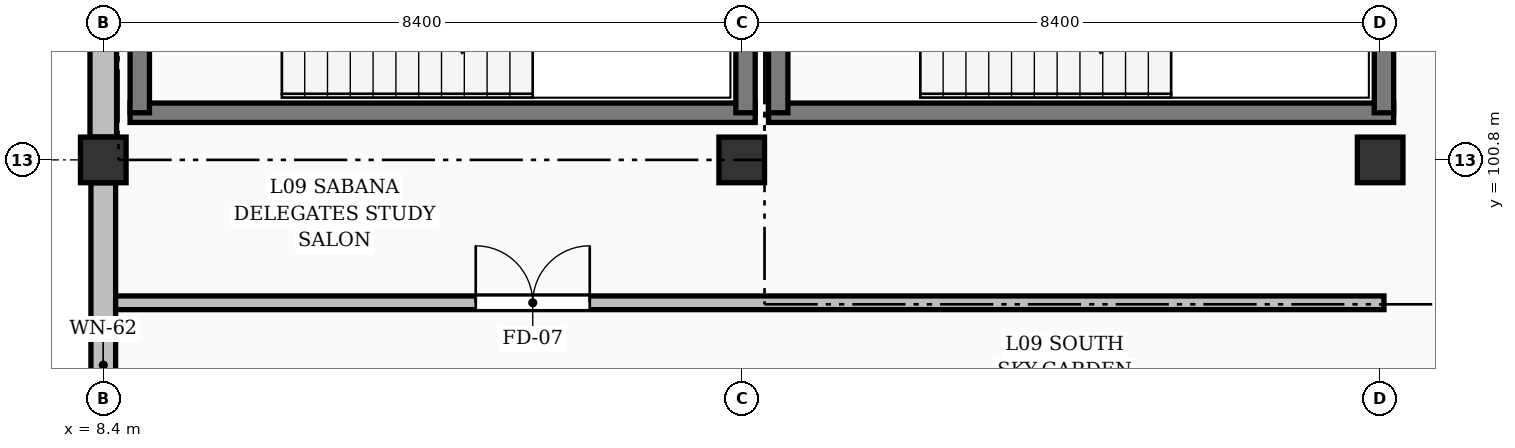
"""IFC4 building model, lengths in metres.
Left out: names, types, materials, properties, quantities, classifications, styles, units other than length and angle.
Written with IfcOpenShell. Run it as: python <this file> out.ifc"""

import sys

from ifc_helpers import new_model, si_unit, direction, frame, frame_2d, origin, origin_2d, place, context, subcontext, project, spatial, rectangle, extrude, element, fill, save


model = new_model("IFC4")
c1 = context("Model", 3, precision=1e-05, world=origin(), true_north=direction((0.0, 1.0)))
c2 = subcontext(c1, "Body", "Model", "MODEL_VIEW")
j1 = project(units=[si_unit("LENGTHUNIT", "METRE"), si_unit("PLANEANGLEUNIT", "RADIAN")], contexts=[c1])
p1 = place(None, origin())
s1 = spatial("IfcSite", under=j1, at=p1, CompositionType="ELEMENT")
p2 = place(p1, origin())
s2 = spatial("IfcBuilding", under=s1, at=p2, CompositionType="ELEMENT")
p3 = place(p2, frame((0.0, 0.0, 31.92)))
s3 = spatial("IfcBuildingStorey", under=s2, at=p3, CompositionType="ELEMENT", Elevation=31.92)
for number, where, z_axis, x_axis in (
    (1, (8.4, 100.8, 0.0), (0.0, 0.0, 1.0), (1.0, 0.0, 0.0)),
    (2, (16.8, 100.8, 0.0), (0.0, 0.0, 1.0), (1.0, 0.0, 0.0)),
    (3, (25.2, 100.8, 0.0), (0.0, 0.0, 1.0), (1.0, 0.0, 0.0)),
):
    element("IfcColumn", number, at=place(p3, frame(where, z_axis=z_axis, x_axis=x_axis)), inside=s3, PredefinedType="COLUMN", context=c2, shape_type="SweptSolid", body=[
        extrude(rectangle(XDim=0.6, YDim=0.6, at=origin_2d()), origin(), (0.0, 0.0, 1.0), 3.36),
    ])
p4 = place(p3, frame((8.4, 92.701, 0.0), z_axis=(0.0, 0.0, 1.0), x_axis=(0.0, 1.0, 0.0)))
e4 = element("IfcWall", 4, at=p4, inside=s3, PredefinedType="SOLIDWALL", context=c2, shape_type="SweptSolid", body=[
    extrude(rectangle(XDim=7.798, YDim=0.325, at=frame_2d((3.899, 0.0))), origin(), (0.0, 0.0, 1.0), 2.474),
])
p5 = place(p4, frame((2.429, 0.0, 0.3)))
e5 = element("IfcOpeningElement", 5, at=p5, cuts=e4, PredefinedType="OPENING", context=c2, shape_type="SweptSolid", body=[
    extrude(rectangle(XDim=0.84, YDim=1.75, at=frame_2d((0.42, 0.875))), frame((0.0, 0.172, 0.0), z_axis=(0.0, -1.0, 0.0), x_axis=(1.0, 0.0, 0.0)), (0.0, 0.0, 1.0), 0.345),
])
p6 = place(p4, frame((4.979, 0.0, 0.3)))
e6 = element("IfcOpeningElement", 6, at=p6, cuts=e4, PredefinedType="OPENING", context=c2, shape_type="SweptSolid", body=[
    extrude(rectangle(XDim=0.84, YDim=1.75, at=frame_2d((0.42, 0.875))), frame((0.0, 0.172, 0.0), z_axis=(0.0, -1.0, 0.0), x_axis=(1.0, 0.0, 0.0)), (0.0, 0.0, 1.0), 0.345),
])
p7 = place(p3, frame((8.4, 101.101, 0.0), z_axis=(0.0, 0.0, 1.0), x_axis=(0.0, 1.0, 0.0)))
e7 = element("IfcWall", 7, at=p7, inside=s3, PredefinedType="SOLIDWALL", context=c2, shape_type="SweptSolid", body=[
    extrude(rectangle(XDim=7.798, YDim=0.35, at=frame_2d((3.899, 0.0))), origin(), (0.0, 0.0, 1.0), 2.474),
])
p8 = place(p7, frame((2.499, 0.0, 0.3)))
e8 = element("IfcOpeningElement", 8, at=p8, cuts=e7, PredefinedType="OPENING", context=c2, shape_type="SweptSolid", body=[
    extrude(rectangle(XDim=0.7, YDim=1.9, at=frame_2d((0.35, 0.95))), frame((0.0, 0.185, 0.0), z_axis=(0.0, -1.0, 0.0), x_axis=(1.0, 0.0, 0.0)), (0.0, 0.0, 1.0), 0.37),
])
p9 = place(p7, frame((4.599, 0.0, 0.3)))
e9 = element("IfcOpeningElement", 9, at=p9, cuts=e7, PredefinedType="OPENING", context=c2, shape_type="SweptSolid", body=[
    extrude(rectangle(XDim=0.7, YDim=1.9, at=frame_2d((0.35, 0.95))), frame((0.0, 0.185, 0.0), z_axis=(0.0, -1.0, 0.0), x_axis=(1.0, 0.0, 0.0)), (0.0, 0.0, 1.0), 0.37),
])
p10 = place(p3, frame((8.752, 101.42, 0.0), z_axis=(0.0, 0.0, 1.0), x_axis=(1.0, 0.0, 0.0)))
e10 = element("IfcWall", 10, at=p10, inside=s3, PredefinedType="SOLIDWALL", context=c2, shape_type="SweptSolid", body=[
    extrude(rectangle(XDim=8.225, YDim=0.255, at=frame_2d((4.113, 0.0))), origin(), (0.0, 0.0, 1.0), 3.1),
])
for number, where, z_axis, x_axis in (
    (11, (8.88, 101.42, 0.0), (0.0, 0.0, 1.0), (0.0, 1.0, 0.0)),
    (12, (16.85, 101.42, 0.0), (0.0, 0.0, 1.0), (0.0, 1.0, 0.0)),
):
    element("IfcWall", number, at=place(p3, frame(where, z_axis=z_axis, x_axis=x_axis)), inside=s3, PredefinedType="SOLIDWALL", context=c2, shape_type="SweptSolid", body=[
        extrude(rectangle(XDim=3.73, YDim=0.255, at=frame_2d((1.865, 0.0))), origin(), (0.0, 0.0, 1.0), 3.1),
    ])
p11 = place(p3, frame((17.153, 101.42, 0.0), z_axis=(0.0, 0.0, 1.0), x_axis=(1.0, 0.0, 0.0)))
e13 = element("IfcWall", 13, at=p11, inside=s3, PredefinedType="SOLIDWALL", context=c2, shape_type="SweptSolid", body=[
    extrude(rectangle(XDim=8.225, YDim=0.255, at=frame_2d((4.112, 0.0))), origin(), (0.0, 0.0, 1.0), 3.1),
])
for number, where, z_axis, x_axis in (
    (14, (17.28, 101.42, 0.0), (0.0, 0.0, 1.0), (0.0, 1.0, 0.0)),
    (15, (25.25, 101.42, 0.0), (0.0, 0.0, 1.0), (0.0, 1.0, 0.0)),
):
    element("IfcWall", number, at=place(p3, frame(where, z_axis=z_axis, x_axis=x_axis)), inside=s3, PredefinedType="SOLIDWALL", context=c2, shape_type="SweptSolid", body=[
        extrude(rectangle(XDim=3.73, YDim=0.255, at=frame_2d((1.865, 0.0))), origin(), (0.0, 0.0, 1.0), 3.1),
    ])
p12 = place(p3, frame((8.562, 98.92, 0.0), z_axis=(0.0, 0.0, 1.0), x_axis=(1.0, 0.0, 0.0)))
e16 = element("IfcWall", 16, at=p12, inside=s3, PredefinedType="PARTITIONING", context=c2, shape_type="SweptSolid", body=[
    extrude(rectangle(XDim=16.688, YDim=0.18, at=frame_2d((8.344, 0.0))), origin(), (0.0, 0.0, 1.0), 3.1),
])
p13 = place(p12, frame((4.738, 0.0, 0.0)))
e17 = element("IfcOpeningElement", 17, at=p13, cuts=e16, PredefinedType="OPENING", context=c2, shape_type="SweptSolid", body=[
    extrude(rectangle(XDim=1.5, YDim=2.2, at=frame_2d((0.75, 1.1))), frame((0.0, 0.1, 0.0), z_axis=(0.0, -1.0, 0.0), x_axis=(1.0, 0.0, 0.0)), (0.0, 0.0, 1.0), 0.2),
])
p14 = place(p6, origin())
e18 = element("IfcWindow", 18, at=p14, inside=s3, PartitioningType="SINGLE_PANEL", PredefinedType="WINDOW", context=c2, shape_type="SweptSolid", body=[
    extrude(rectangle(XDim=0.84, YDim=1.75, at=frame_2d((0.42, 0.875))), frame((0.0, 0.03, 0.0), z_axis=(0.0, -1.0, 0.0), x_axis=(1.0, 0.0, 0.0)), (0.0, 0.0, 1.0), 0.06),
])
fill(e6, e18)
p15 = place(p13, origin())
e19 = element("IfcDoor", 19, at=p15, inside=s3, OperationType="DOUBLE_DOOR_SINGLE_SWING", PredefinedType="DOOR", context=c2, shape_type="SweptSolid", body=[
    extrude(rectangle(XDim=1.5, YDim=2.2, at=frame_2d((0.75, 1.1))), frame((0.0, 0.025, 0.0), z_axis=(0.0, -1.0, 0.0), x_axis=(1.0, 0.0, 0.0)), (0.0, 0.0, 1.0), 0.05),
])
fill(e17, e19)
save(model, sys.argv[1])
